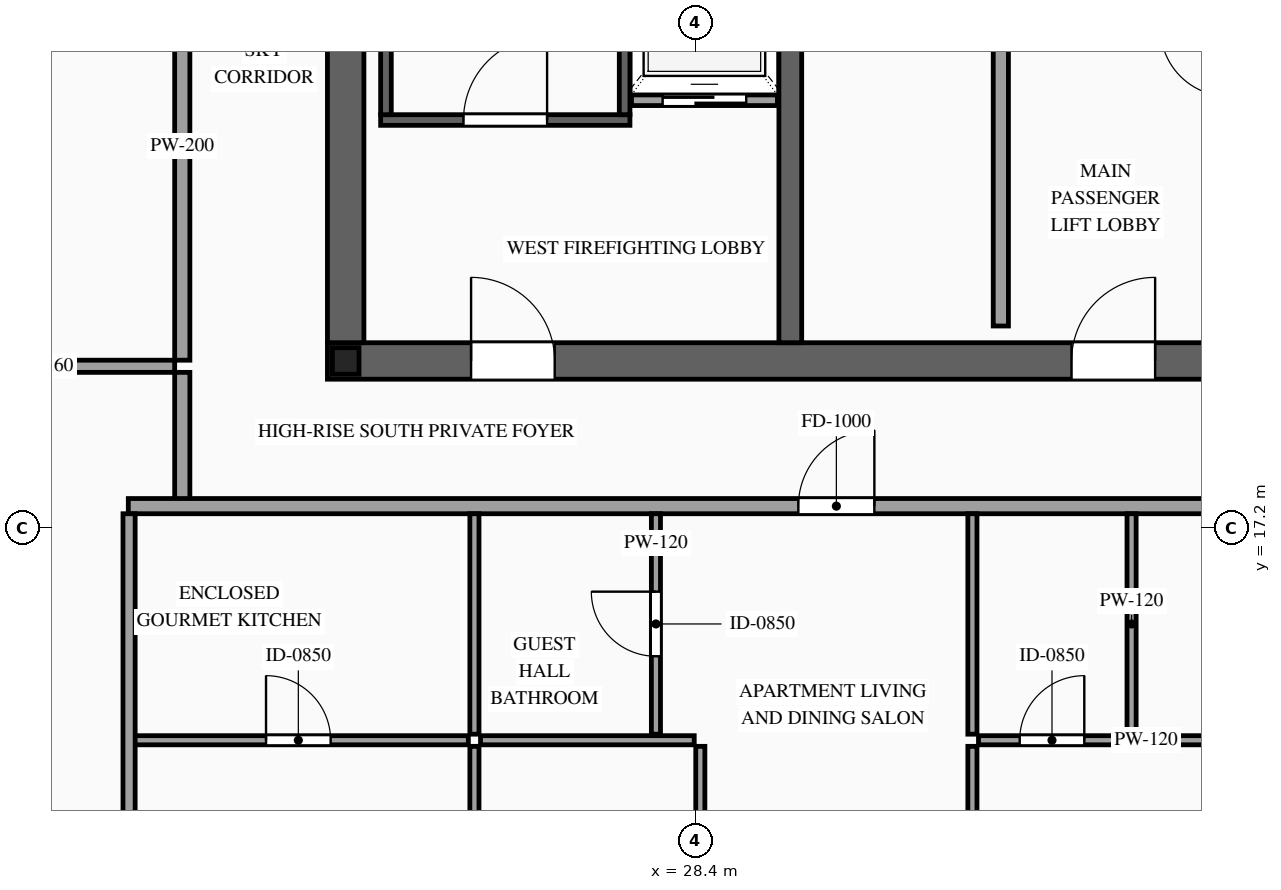
"""IFC4 building model, lengths in metres.
Left out: names, types, materials, properties, quantities, classifications, styles, units other than length and angle.
Written with IfcOpenShell. Run it as: python <this file> out.ifc"""

import sys

from ifc_helpers import new_model, si_unit, direction, frame, frame_2d, origin, origin_2d, place, context, subcontext, project, spatial, rectangle, i_section, extrude, source, transform, mapped, element, fill, save


model = new_model("IFC4")
c1 = context("Model", 3, precision=1e-05, world=origin(), true_north=direction((0.0, 1.0)))
c2 = subcontext(c1, "Body", "Model", "MODEL_VIEW")
j1 = project(units=[si_unit("LENGTHUNIT", "METRE"), si_unit("PLANEANGLEUNIT", "RADIAN")], contexts=[c1])
p1 = place(None, origin())
s1 = spatial("IfcSite", under=j1, at=p1, CompositionType="ELEMENT")
p2 = place(p1, origin())
s2 = spatial("IfcBuilding", under=s1, at=p2, CompositionType="ELEMENT")
p3 = place(p2, frame((0.0, 0.0, 325.2)))
s3 = spatial("IfcBuildingStorey", under=s2, at=p3, CompositionType="ELEMENT", Elevation=325.2)
p4 = place(p3, frame((23.56, 19.4, 0.0), z_axis=(0.0, 0.0, 1.0), x_axis=(1.0, 0.0, 0.0)))
e1 = element("IfcWall", 1, at=p4, inside=s3, PredefinedType="SHEAR", context=c2, shape_type="SweptSolid", body=[
    extrude(rectangle(XDim=26.88, YDim=0.48, at=frame_2d((13.44, 0.0))), origin(), (0.0, 0.0, 1.0), 3.5),
])
p5 = place(p4, frame((1.89, 0.0, 0.0)))
e2 = element("IfcOpeningElement", 2, at=p5, cuts=e1, PredefinedType="OPENING", context=c2, shape_type="SweptSolid", body=[
    extrude(rectangle(XDim=1.1, YDim=2.2, at=frame_2d((0.55, 1.1))), frame((0.0, 0.255, 0.0), z_axis=(0.0, -1.0, 0.0), x_axis=(1.0, 0.0, 0.0)), (0.0, 0.0, 1.0), 0.51),
])
p6 = place(p4, frame((9.79, 0.0, 0.0)))
e3 = element("IfcOpeningElement", 3, at=p6, cuts=e1, PredefinedType="OPENING", context=c2, shape_type="SweptSolid", body=[
    extrude(rectangle(XDim=1.1, YDim=2.2, at=frame_2d((0.55, 1.1))), frame((0.0, 0.255, 0.0), z_axis=(0.0, -1.0, 0.0), x_axis=(1.0, 0.0, 0.0)), (0.0, 0.0, 1.0), 0.51),
])
p7 = place(p4, frame((22.99, 0.0, 0.0)))
e4 = element("IfcOpeningElement", 4, at=p7, cuts=e1, PredefinedType="OPENING", context=c2, shape_type="SweptSolid", body=[
    extrude(rectangle(XDim=1.1, YDim=2.2, at=frame_2d((0.55, 1.1))), frame((0.0, 0.255, 0.0), z_axis=(0.0, -1.0, 0.0), x_axis=(1.0, 0.0, 0.0)), (0.0, 0.0, 1.0), 0.51),
])
p8 = place(p4, frame((19.61, 0.0, 0.0)))
e5 = element("IfcOpeningElement", 5, at=p8, cuts=e1, PredefinedType="OPENING", context=c2, shape_type="SweptSolid", body=[
    extrude(rectangle(XDim=0.9, YDim=2.15, at=frame_2d((0.45, 1.075))), frame((0.0, 0.255, 0.0), z_axis=(0.0, -1.0, 0.0), x_axis=(1.0, 0.0, 0.0)), (0.0, 0.0, 1.0), 0.51),
])
p9 = place(p4, frame((18.17, 0.0, 0.0)))
e6 = element("IfcOpeningElement", 6, at=p9, cuts=e1, PredefinedType="OPENING", context=c2, shape_type="SweptSolid", body=[
    extrude(rectangle(XDim=0.9, YDim=2.15, at=frame_2d((0.45, 1.075))), frame((0.0, 0.255, 0.0), z_axis=(0.0, -1.0, 0.0), x_axis=(1.0, 0.0, 0.0)), (0.0, 0.0, 1.0), 0.51),
])
m1 = source(origin(), c2, "Body", "SweptSolid", [
    extrude(rectangle(XDim=12.32, YDim=0.48, at=frame_2d((6.16, 0.0))), origin(), (0.0, 0.0, 1.0), 3.5),
])
p10 = place(p3, frame((23.8, 19.64, 0.0), z_axis=(0.0, 0.0, 1.0), x_axis=(0.0, 1.0, 0.0)))
e7 = element("IfcWall", 7, at=p10, inside=s3, PredefinedType="SHEAR", context=c2, shape_type="MappedRepresentation", body=[
    mapped(m1, transform((0.0, 0.0, 0.0), scale=1.0)),
])
m2 = source(origin(), c2, "Body", "SweptSolid", [
    extrude(rectangle(XDim=12.32, YDim=0.3, at=frame_2d((6.16, 0.0))), origin(), (0.0, 0.0, 1.0), 3.5),
])
p11 = place(p3, frame((29.65, 19.64, 0.0), z_axis=(0.0, 0.0, 1.0), x_axis=(0.0, 1.0, 0.0)))
e8 = element("IfcWall", 8, at=p11, inside=s3, PredefinedType="SOLIDWALL", context=c2, shape_type="MappedRepresentation", body=[
    mapped(m2, transform((0.0, 0.0, 0.0), scale=1.0)),
])
m3 = source(origin(), c2, "Body", "SweptSolid", [
    extrude(i_section(OverallWidth=0.35, OverallDepth=0.35, WebThickness=0.012, FlangeThickness=0.019, at=origin_2d()), origin(), (0.0, 0.0, 1.0), 3.5),
])
p12 = place(p3, frame((23.8, 19.4, 0.0), z_axis=(0.0, 0.0, 1.0), x_axis=(1.0, 0.0, 0.0)))
e9 = element("IfcColumn", 9, at=p12, inside=s3, PredefinedType="COLUMN", context=c2, shape_type="MappedRepresentation", body=[
    mapped(m3, transform((0.0, 0.0, 0.0), scale=1.0)),
])
p13 = place(p3, frame((27.56, 22.83, 0.0), z_axis=(0.0, 0.0, 1.0), x_axis=(1.0, 0.0, 0.0)))
e10 = element("IfcWall", 10, at=p13, inside=s3, PredefinedType="SOLIDWALL", context=c2, shape_type="SweptSolid", body=[
    extrude(rectangle(XDim=1.92, YDim=0.14, at=frame_2d((0.96, 0.0))), origin(), (0.0, 0.0, 1.0), 3.28),
])
p14 = place(p13, frame((0.41, 0.0, 0.0)))
e11 = element("IfcOpeningElement", 11, at=p14, cuts=e10, PredefinedType="OPENING", context=c2, shape_type="SweptSolid", body=[
    extrude(rectangle(XDim=1.1, YDim=2.2, at=frame_2d((0.55, 1.1))), frame((0.0, 0.085, 0.0), z_axis=(0.0, -1.0, 0.0), x_axis=(1.0, 0.0, 0.0)), (0.0, 0.0, 1.0), 0.17),
])
p15 = place(p3, frame((24.26, 22.57, 0.0), z_axis=(0.0, 0.0, 1.0), x_axis=(1.0, 0.0, 0.0)))
e12 = element("IfcWall", 12, at=p15, inside=s3, PredefinedType="SOLIDWALL", context=c2, shape_type="SweptSolid", body=[
    extrude(rectangle(XDim=3.28, YDim=0.14, at=frame_2d((1.64, 0.0))), origin(), (0.0, 0.0, 1.0), 3.28),
])
p16 = place(p15, frame((1.09, 0.0, 0.0)))
e13 = element("IfcOpeningElement", 13, at=p16, cuts=e12, PredefinedType="OPENING", context=c2, shape_type="SweptSolid", body=[
    extrude(rectangle(XDim=1.1, YDim=2.2, at=frame_2d((0.55, 1.1))), frame((0.0, 0.085, 0.0), z_axis=(0.0, -1.0, 0.0), x_axis=(1.0, 0.0, 0.0)), (0.0, 0.0, 1.0), 0.17),
])
m4 = source(origin(), c2, "Body", "SweptSolid", [
    extrude(rectangle(XDim=8.94, YDim=0.14, at=frame_2d((4.47, 0.0))), origin(), (0.0, 0.0, 1.0), 3.28),
])
for number, where, z_axis, x_axis in (
    (14, (24.33, 22.64, 0.0), (0.0, 0.0, 1.0), (0.0, 1.0, 0.0)),
    (15, (27.47, 22.64, 0.0), (0.0, 0.0, 1.0), (0.0, 1.0, 0.0)),
):
    element("IfcWall", number, at=place(p3, frame(where, z_axis=z_axis, x_axis=x_axis)), inside=s3, PredefinedType="SOLIDWALL", context=c2, shape_type="MappedRepresentation", body=[
        mapped(m4, transform((0.0, 0.0, 0.0), scale=1.0)),
    ])
p17 = place(p3, frame((32.42, 19.86, 0.0), z_axis=(0.0, 0.0, 1.0), x_axis=(0.0, 1.0, 0.0)))
e16 = element("IfcWall", 16, at=p17, inside=s3, PredefinedType="PARTITIONING", context=c2, shape_type="SweptSolid", body=[
    extrude(rectangle(XDim=11.88, YDim=0.2, at=frame_2d((5.94, 0.0))), origin(), (0.0, 0.0, 1.0), 3.28),
])
p18 = place(p17, frame((5.49, 0.0, 0.0)))
e17 = element("IfcOpeningElement", 17, at=p18, cuts=e16, PredefinedType="OPENING", context=c2, shape_type="SweptSolid", body=[
    extrude(rectangle(XDim=0.9, YDim=2.15, at=frame_2d((0.45, 1.075))), frame((0.0, 0.115, 0.0), z_axis=(0.0, -1.0, 0.0), x_axis=(1.0, 0.0, 0.0)), (0.0, 0.0, 1.0), 0.23),
])
m5 = source(origin(), c2, "Body", "SweptSolid", [
    extrude(rectangle(XDim=1.7, YDim=0.2, at=frame_2d((0.85, 0.0))), origin(), (0.0, 0.0, 1.0), 3.28),
])
p19 = place(p3, frame((21.65, 17.55, 0.0), z_axis=(0.0, 0.0, 1.0), x_axis=(0.0, 1.0, 0.0)))
e18 = element("IfcWall", 18, at=p19, inside=s3, PredefinedType="PARTITIONING", context=c2, shape_type="MappedRepresentation", body=[
    mapped(m5, transform((0.0, 0.0, 0.0), scale=1.0)),
])
p20 = place(p3, frame((20.94, 17.49, 0.0), z_axis=(0.0, 0.0, 1.0), x_axis=(1.0, 0.0, 0.0)))
e19 = element("IfcWall", 19, at=p20, inside=s3, PredefinedType="PARTITIONING", context=c2, shape_type="SweptSolid", body=[
    extrude(rectangle(XDim=15.98, YDim=0.2, at=frame_2d((7.99, 0.0))), origin(), (0.0, 0.0, 1.0), 3.28),
])
p21 = place(p20, frame((8.816, 0.0, 0.0)))
e20 = element("IfcOpeningElement", 20, at=p21, cuts=e19, PredefinedType="OPENING", context=c2, shape_type="SweptSolid", body=[
    extrude(rectangle(XDim=1.0, YDim=2.2, at=frame_2d((0.5, 1.1))), frame((0.0, 0.115, 0.0), z_axis=(0.0, -1.0, 0.0), x_axis=(1.0, 0.0, 0.0)), (0.0, 0.0, 1.0), 0.23),
])
p22 = place(p3, frame((20.94, 14.41, 0.0), z_axis=(0.0, 0.0, 1.0), x_axis=(1.0, 0.0, 0.0)))
e21 = element("IfcWall", 21, at=p22, inside=s3, PredefinedType="PARTITIONING", context=c2, shape_type="SweptSolid", body=[
    extrude(rectangle(XDim=4.474, YDim=0.12, at=frame_2d((2.237, 0.0))), origin(), (0.0, 0.0, 1.0), 3.28),
])
p23 = place(p22, frame((1.812, 0.0, 0.0)))
e22 = element("IfcOpeningElement", 22, at=p23, cuts=e21, PredefinedType="OPENING", context=c2, shape_type="SweptSolid", body=[
    extrude(rectangle(XDim=0.85, YDim=2.1, at=frame_2d((0.425, 1.05))), frame((0.0, 0.075, 0.0), z_axis=(0.0, -1.0, 0.0), x_axis=(1.0, 0.0, 0.0)), (0.0, 0.0, 1.0), 0.15),
])
m6 = source(origin(), c2, "Body", "SweptSolid", [
    extrude(rectangle(XDim=2.9, YDim=0.12, at=frame_2d((1.45, 0.0))), origin(), (0.0, 0.0, 1.0), 3.28),
])
p24 = place(p3, frame((25.494, 14.49, 0.0), z_axis=(0.0, 0.0, 1.0), x_axis=(0.0, 1.0, 0.0)))
e23 = element("IfcWall", 23, at=p24, inside=s3, PredefinedType="PARTITIONING", context=c2, shape_type="MappedRepresentation", body=[
    mapped(m6, transform((0.0, 0.0, 0.0), scale=1.0)),
])
p25 = place(p3, frame((27.882, 14.49, 0.0), z_axis=(0.0, 0.0, 1.0), x_axis=(0.0, 1.0, 0.0)))
e24 = element("IfcWall", 24, at=p25, inside=s3, PredefinedType="PARTITIONING", context=c2, shape_type="SweptSolid", body=[
    extrude(rectangle(XDim=2.9, YDim=0.12, at=frame_2d((1.45, 0.0))), origin(), (0.0, 0.0, 1.0), 3.28),
])
p26 = place(p25, frame((1.025, 0.0, 0.0)))
e25 = element("IfcOpeningElement", 25, at=p26, cuts=e24, PredefinedType="OPENING", context=c2, shape_type="SweptSolid", body=[
    extrude(rectangle(XDim=0.85, YDim=2.1, at=frame_2d((0.425, 1.05))), frame((0.0, 0.075, 0.0), z_axis=(0.0, -1.0, 0.0), x_axis=(1.0, 0.0, 0.0)), (0.0, 0.0, 1.0), 0.15),
])
for number, where, z_axis, x_axis in (
    (26, (34.14, 14.49, 0.0), (0.0, 0.0, 1.0), (0.0, 1.0, 0.0)),
    (27, (32.046, 14.49, 0.0), (0.0, 0.0, 1.0), (0.0, 1.0, 0.0)),
):
    element("IfcWall", number, at=place(p3, frame(where, z_axis=z_axis, x_axis=x_axis)), inside=s3, PredefinedType="PARTITIONING", context=c2, shape_type="MappedRepresentation", body=[
        mapped(m6, transform((0.0, 0.0, 0.0), scale=1.0)),
    ])
p27 = place(p3, frame((25.494, 6.85, 0.0), z_axis=(0.0, 0.0, 1.0), x_axis=(0.0, 1.0, 0.0)))
e28 = element("IfcWall", 28, at=p27, inside=s3, PredefinedType="PARTITIONING", context=c2, shape_type="SweptSolid", body=[
    extrude(rectangle(XDim=7.48, YDim=0.12, at=frame_2d((3.74, 0.0))), origin(), (0.0, 0.0, 1.0), 3.28),
])
p28 = place(p27, frame((3.29, 0.0, 0.0)))
e29 = element("IfcOpeningElement", 29, at=p28, cuts=e28, PredefinedType="OPENING", context=c2, shape_type="SweptSolid", body=[
    extrude(rectangle(XDim=0.9, YDim=2.15, at=frame_2d((0.45, 1.075))), frame((0.0, 0.075, 0.0), z_axis=(0.0, -1.0, 0.0), x_axis=(1.0, 0.0, 0.0)), (0.0, 0.0, 1.0), 0.15),
])
p29 = place(p3, frame((32.126, 14.41, 0.0), z_axis=(0.0, 0.0, 1.0), x_axis=(1.0, 0.0, 0.0)))
e30 = element("IfcWall", 30, at=p29, inside=s3, PredefinedType="PARTITIONING", context=c2, shape_type="SweptSolid", body=[
    extrude(rectangle(XDim=4.794, YDim=0.12, at=frame_2d((2.397, 0.0))), origin(), (0.0, 0.0, 1.0), 3.28),
])
p30 = place(p29, frame((3.019, 0.0, 0.0)))
e31 = element("IfcOpeningElement", 31, at=p30, cuts=e30, PredefinedType="OPENING", context=c2, shape_type="SweptSolid", body=[
    extrude(rectangle(XDim=0.85, YDim=2.1, at=frame_2d((0.425, 1.05))), frame((0.0, 0.075, 0.0), z_axis=(0.0, -1.0, 0.0), x_axis=(1.0, 0.0, 0.0)), (0.0, 0.0, 1.0), 0.15),
])
p31 = place(p29, frame((0.542, 0.0, 0.0)))
e32 = element("IfcOpeningElement", 32, at=p31, cuts=e30, PredefinedType="OPENING", context=c2, shape_type="SweptSolid", body=[
    extrude(rectangle(XDim=0.85, YDim=2.1, at=frame_2d((0.425, 1.05))), frame((0.0, 0.075, 0.0), z_axis=(0.0, -1.0, 0.0), x_axis=(1.0, 0.0, 0.0)), (0.0, 0.0, 1.0), 0.15),
])
p32 = place(p3, frame((32.046, 6.85, 0.0), z_axis=(0.0, 0.0, 1.0), x_axis=(0.0, 1.0, 0.0)))
e33 = element("IfcWall", 33, at=p32, inside=s3, PredefinedType="PARTITIONING", context=c2, shape_type="SweptSolid", body=[
    extrude(rectangle(XDim=7.48, YDim=0.12, at=frame_2d((3.74, 0.0))), origin(), (0.0, 0.0, 1.0), 3.28),
])
p33 = place(p32, frame((3.29, 0.0, 0.0)))
e34 = element("IfcOpeningElement", 34, at=p33, cuts=e33, PredefinedType="OPENING", context=c2, shape_type="SweptSolid", body=[
    extrude(rectangle(XDim=0.9, YDim=2.15, at=frame_2d((0.45, 1.075))), frame((0.0, 0.075, 0.0), z_axis=(0.0, -1.0, 0.0), x_axis=(1.0, 0.0, 0.0)), (0.0, 0.0, 1.0), 0.15),
])
m7 = source(origin(), c2, "Body", "SweptSolid", [
    extrude(rectangle(XDim=2.812, YDim=0.12, at=frame_2d((1.406, 0.0))), origin(), (0.0, 0.0, 1.0), 3.28),
])
p34 = place(p3, frame((25.574, 14.41, 0.0), z_axis=(0.0, 0.0, 1.0), x_axis=(1.0, 0.0, 0.0)))
e35 = element("IfcWall", 35, at=p34, inside=s3, PredefinedType="PARTITIONING", context=c2, shape_type="MappedRepresentation", body=[
    mapped(m7, transform((0.0, 0.0, 0.0), scale=1.0)),
])
p35 = place(p3, frame((28.466, 6.85, 0.0), z_axis=(0.0, 0.0, 1.0), x_axis=(0.0, 1.0, 0.0)))
e36 = element("IfcWall", 36, at=p35, inside=s3, PredefinedType="PARTITIONING", context=c2, shape_type="SweptSolid", body=[
    extrude(rectangle(XDim=7.48, YDim=0.12, at=frame_2d((3.74, 0.0))), origin(), (0.0, 0.0, 1.0), 3.28),
])
p36 = place(p35, frame((3.29, 0.0, 0.0)))
e37 = element("IfcOpeningElement", 37, at=p36, cuts=e36, PredefinedType="OPENING", context=c2, shape_type="SweptSolid", body=[
    extrude(rectangle(XDim=0.9, YDim=2.15, at=frame_2d((0.45, 1.075))), frame((0.0, 0.075, 0.0), z_axis=(0.0, -1.0, 0.0), x_axis=(1.0, 0.0, 0.0)), (0.0, 0.0, 1.0), 0.15),
])
m8 = source(origin(), c2, "Body", "SweptSolid", [
    extrude(rectangle(XDim=10.39, YDim=0.16, at=frame_2d((5.195, 0.0))), origin(), (0.0, 0.0, 1.0), 3.28),
])
p37 = place(p3, frame((20.95, 7.0, 0.0), z_axis=(0.0, 0.0, 1.0), x_axis=(0.0, 1.0, 0.0)))
e38 = element("IfcWall", 38, at=p37, inside=s3, PredefinedType="PARTITIONING", context=c2, shape_type="MappedRepresentation", body=[
    mapped(m8, transform((0.0, 0.0, 0.0), scale=1.0)),
])
p38 = place(p3, frame((21.65, 19.41, 0.0), z_axis=(0.0, 0.0, 1.0), x_axis=(0.0, 1.0, 0.0)))
e39 = element("IfcWall", 39, at=p38, inside=s3, PredefinedType="PARTITIONING", context=c2, shape_type="SweptSolid", body=[
    extrude(rectangle(XDim=12.78, YDim=0.2, at=frame_2d((6.39, 0.0))), origin(), (0.0, 0.0, 1.0), 3.28),
])
p39 = place(p38, frame((5.89, 0.0, 0.0)))
e40 = element("IfcOpeningElement", 40, at=p39, cuts=e39, PredefinedType="OPENING", context=c2, shape_type="SweptSolid", body=[
    extrude(rectangle(XDim=1.0, YDim=2.2, at=frame_2d((0.5, 1.1))), frame((0.0, 0.115, 0.0), z_axis=(0.0, -1.0, 0.0), x_axis=(1.0, 0.0, 0.0)), (0.0, 0.0, 1.0), 0.23),
])
m9 = source(origin(), c2, "Body", "SweptSolid", [
    extrude(rectangle(XDim=3.5, YDim=0.16, at=frame_2d((1.75, 0.0))), origin(), (0.0, 0.0, 1.0), 2.825),
])
p40 = place(p3, frame((18.05, 19.33, 0.0), z_axis=(0.0, 0.0, 1.0), x_axis=(1.0, 0.0, 0.0)))
e41 = element("IfcWall", 41, at=p40, inside=s3, PredefinedType="PARTITIONING", context=c2, shape_type="MappedRepresentation", body=[
    mapped(m9, transform((0.0, 0.0, 0.0), scale=1.0)),
])
m10 = source(origin(), c2, "Body", "SweptSolid", [
    extrude(rectangle(XDim=1.1, YDim=2.2, at=frame_2d((0.55, 1.1))), frame((0.0, 0.025, 0.0), z_axis=(0.0, -1.0, 0.0), x_axis=(1.0, 0.0, 0.0)), (0.0, 0.0, 1.0), 0.05),
])
p41 = place(p14, origin())
e42 = element("IfcDoor", 42, at=p41, inside=s3, OperationType="SLIDING_TO_LEFT", PredefinedType="DOOR", context=c2, shape_type="MappedRepresentation", body=[
    mapped(m10, transform((0.0, 0.0, 0.0), scale=1.0)),
])
fill(e11, e42)
m11 = source(origin(), c2, "Body", "SweptSolid", [
    extrude(rectangle(XDim=1.1, YDim=2.2, at=frame_2d((0.55, 1.1))), frame((0.0, 0.025, 0.0), z_axis=(0.0, -1.0, 0.0), x_axis=(1.0, 0.0, 0.0)), (0.0, 0.0, 1.0), 0.05),
])
p42 = place(p16, origin())
e43 = element("IfcDoor", 43, at=p42, inside=s3, OperationType="SINGLE_SWING_RIGHT", PredefinedType="DOOR", context=c2, shape_type="MappedRepresentation", body=[
    mapped(m11, transform((0.0, 0.0, 0.0), scale=1.0)),
])
fill(e13, e43)
p43 = place(p5, origin())
e44 = element("IfcDoor", 44, at=p43, inside=s3, OperationType="SINGLE_SWING_LEFT", PredefinedType="DOOR", context=c2, shape_type="MappedRepresentation", body=[
    mapped(m11, transform((0.0, 0.0, 0.0), scale=1.0)),
])
fill(e2, e44)
p44 = place(p6, origin())
e45 = element("IfcDoor", 45, at=p44, inside=s3, OperationType="SINGLE_SWING_RIGHT", PredefinedType="DOOR", context=c2, shape_type="MappedRepresentation", body=[
    mapped(m11, transform((0.0, 0.0, 0.0), scale=1.0)),
])
fill(e3, e45)
m12 = source(origin(), c2, "Body", "SweptSolid", [
    extrude(rectangle(XDim=1.0, YDim=2.2, at=frame_2d((0.5, 1.1))), frame((0.0, 0.025, 0.0), z_axis=(0.0, -1.0, 0.0), x_axis=(1.0, 0.0, 0.0)), (0.0, 0.0, 1.0), 0.05),
])
p45 = place(p21, origin())
e46 = element("IfcDoor", 46, at=p45, inside=s3, OperationType="SINGLE_SWING_RIGHT", PredefinedType="DOOR", context=c2, shape_type="MappedRepresentation", body=[
    mapped(m12, transform((0.0, 0.0, 0.0), scale=1.0)),
])
fill(e20, e46)
m13 = source(origin(), c2, "Body", "SweptSolid", [
    extrude(rectangle(XDim=0.85, YDim=2.1, at=frame_2d((0.425, 1.05))), frame((0.0, 0.025, 0.0), z_axis=(0.0, -1.0, 0.0), x_axis=(1.0, 0.0, 0.0)), (0.0, 0.0, 1.0), 0.05),
])
p46 = place(p23, origin())
e47 = element("IfcDoor", 47, at=p46, inside=s3, OperationType="SINGLE_SWING_LEFT", PredefinedType="DOOR", context=c2, shape_type="MappedRepresentation", body=[
    mapped(m13, transform((0.0, 0.0, 0.0), scale=1.0)),
])
fill(e22, e47)
p47 = place(p26, origin())
e48 = element("IfcDoor", 48, at=p47, inside=s3, OperationType="SINGLE_SWING_RIGHT", PredefinedType="DOOR", context=c2, shape_type="MappedRepresentation", body=[
    mapped(m13, transform((0.0, 0.0, 0.0), scale=1.0)),
])
fill(e25, e48)
p48 = place(p31, origin())
e49 = element("IfcDoor", 49, at=p48, inside=s3, OperationType="SINGLE_SWING_RIGHT", PredefinedType="DOOR", context=c2, shape_type="MappedRepresentation", body=[
    mapped(m13, transform((0.0, 0.0, 0.0), scale=1.0)),
])
fill(e32, e49)
save(model, sys.argv[1])
